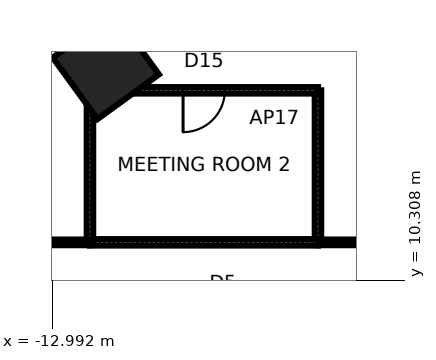
"""IFC4 building model, lengths in metres.
Left out: names, types, materials, properties, quantities, classifications, styles, units other than length and angle.
Written with IfcOpenShell. Run it as: python <this file> out.ifc"""

import sys

from ifc_helpers import new_model, si_unit, direction, frame, frame_2d, origin, origin_2d, place, context, subcontext, project, spatial, rectangle, extrude, element, fill, save


model = new_model("IFC4")
c1 = context("Model", 3, precision=1e-05, world=origin(), true_north=direction((0.0, 1.0)))
c2 = subcontext(c1, "Body", "Model", "MODEL_VIEW")
j1 = project(units=[si_unit("LENGTHUNIT", "METRE"), si_unit("PLANEANGLEUNIT", "RADIAN")], contexts=[c1])
p1 = place(None, origin())
s1 = spatial("IfcSite", under=j1, at=p1, CompositionType="ELEMENT")
p2 = place(p1, origin())
s2 = spatial("IfcBuilding", under=s1, at=p2, CompositionType="ELEMENT")
p3 = place(p2, frame((0.0, 0.0, 44.8)))
s3 = spatial("IfcBuildingStorey", under=s2, at=p3, CompositionType="ELEMENT", Elevation=44.8)
p4 = place(p3, frame((-11.581, 15.94, 0.0), z_axis=(0.0, 0.0, 1.0), x_axis=(-0.587785252292, 0.809016994375, 0.0)))
e1 = element("IfcColumn", 1, at=p4, inside=s3, PredefinedType="COLUMN", context=c2, shape_type="SweptSolid", body=[
    extrude(rectangle(XDim=2.0, YDim=2.0, at=origin_2d()), origin(), (0.0, 0.0, 1.0), 4.2),
])
p5 = place(p3, frame((-2.0, 11.3, 0.0), z_axis=(0.0, 0.0, 1.0), x_axis=(-1.0, 0.0, 0.0)))
e2 = element("IfcWall", 2, at=p5, inside=s3, PredefinedType="PARTITIONING", context=c2, shape_type="SweptSolid", body=[
    extrude(rectangle(XDim=4.0, YDim=0.15, at=frame_2d((2.0, 0.0))), origin(), (0.0, 0.0, 1.0), 4.04),
])
p6 = place(p3, frame((-6.0, 11.3, 0.0), z_axis=(0.0, 0.0, 1.0), x_axis=(0.0, 1.0, 0.0)))
e3 = element("IfcWall", 3, at=p6, inside=s3, PredefinedType="PARTITIONING", context=c2, shape_type="SweptSolid", body=[
    extrude(rectangle(XDim=4.0, YDim=0.17, at=frame_2d((2.0, 0.0))), origin(), (0.0, 0.0, 1.0), 4.04),
])
p7 = place(p3, frame((-6.0, 15.3, 0.0), z_axis=(0.0, 0.0, 1.0), x_axis=(-1.0, 0.0, 0.0)))
e4 = element("IfcWall", 4, at=p7, inside=s3, PredefinedType="PARTITIONING", context=c2, shape_type="SweptSolid", body=[
    extrude(rectangle(XDim=6.0, YDim=0.17, at=frame_2d((3.0, 0.0))), origin(), (0.0, 0.0, 1.0), 4.04),
])
p8 = place(p7, frame((2.45, 0.0, 0.0)))
e5 = element("IfcOpeningElement", 5, at=p8, cuts=e4, PredefinedType="OPENING", context=c2, shape_type="SweptSolid", body=[
    extrude(rectangle(XDim=1.1, YDim=2.4, at=frame_2d((0.55, 1.2))), frame((0.0, 0.095, 0.0), z_axis=(0.0, -1.0, 0.0), x_axis=(1.0, 0.0, 0.0)), (0.0, 0.0, 1.0), 0.19),
])
p9 = place(p3, frame((-12.0, 11.3, 0.0), z_axis=(0.0, 0.0, 1.0), x_axis=(1.0, 0.0, 0.0)))
e6 = element("IfcWall", 6, at=p9, inside=s3, PredefinedType="PARTITIONING", context=c2, shape_type="SweptSolid", body=[
    extrude(rectangle(XDim=6.0, YDim=0.17, at=frame_2d((3.0, 0.0))), origin(), (0.0, 0.0, 1.0), 4.04),
])
p10 = place(p3, frame((-12.0, 15.3, 0.0), z_axis=(0.0, 0.0, 1.0), x_axis=(0.0, -1.0, 0.0)))
e7 = element("IfcWall", 7, at=p10, inside=s3, PredefinedType="PARTITIONING", context=c2, shape_type="SweptSolid", body=[
    extrude(rectangle(XDim=4.0, YDim=0.17, at=frame_2d((2.0, 0.0))), origin(), (0.0, 0.0, 1.0), 4.04),
])
p11 = place(p3, frame((-12.0, 11.3, 0.0), z_axis=(0.0, 0.0, 1.0), x_axis=(-1.0, 0.0, 0.0)))
e8 = element("IfcWall", 8, at=p11, inside=s3, PredefinedType="PARTITIONING", context=c2, shape_type="SweptSolid", body=[
    extrude(rectangle(XDim=4.0, YDim=0.15, at=frame_2d((2.0, 0.0))), origin(), (0.0, 0.0, 1.0), 4.04),
])
p12 = place(p8, origin())
e9 = element("IfcDoor", 9, at=p12, inside=s3, OperationType="SINGLE_SWING_RIGHT", PredefinedType="DOOR", context=c2, shape_type="SweptSolid", body=[
    extrude(rectangle(XDim=1.1, YDim=2.4, at=frame_2d((0.55, 1.2))), frame((0.0, 0.025, 0.0), z_axis=(0.0, -1.0, 0.0), x_axis=(1.0, 0.0, 0.0)), (0.0, 0.0, 1.0), 0.05),
])
fill(e5, e9)
save(model, sys.argv[1])
